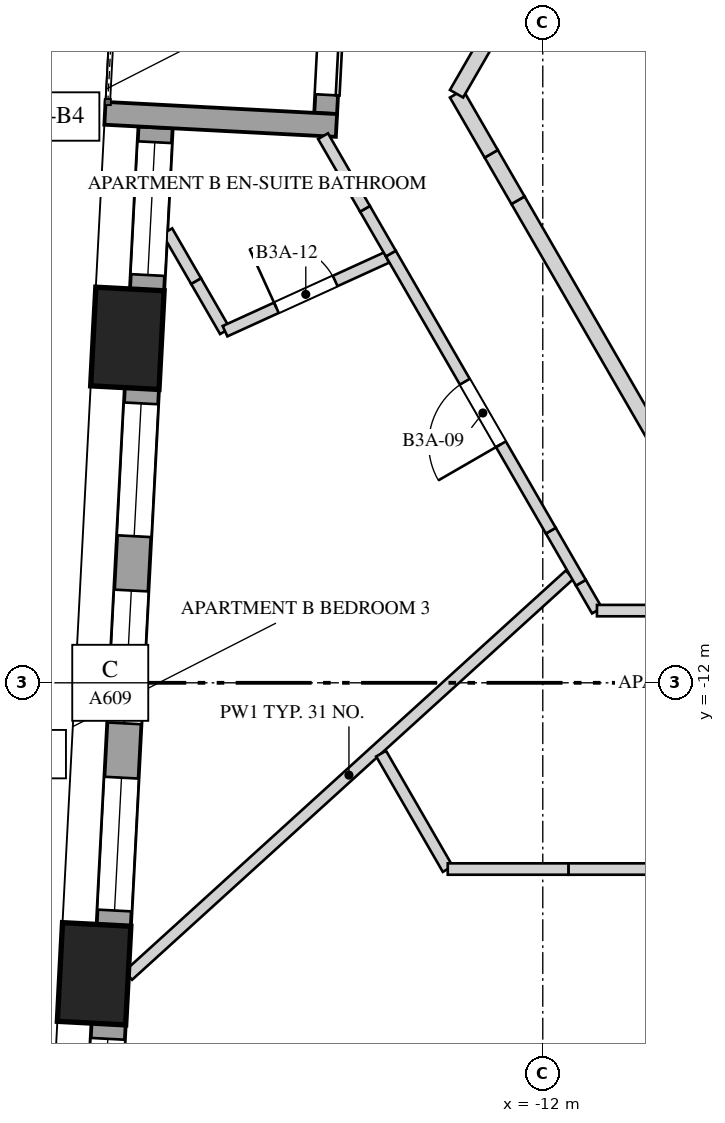
"""IFC4 building model, lengths in metres.
Left out: names, types, materials, properties, quantities, classifications, styles, units other than length and angle.
Written with IfcOpenShell. Run it as: python <this file> out.ifc"""

import sys

from ifc_helpers import new_model, si_unit, direction, frame, frame_2d, origin, origin_2d, place, context, subcontext, project, spatial, rectangle, extrude, element, fill, save


model = new_model("IFC4")
c1 = context("Model", 3, precision=1e-05, world=origin(), true_north=direction((0.0, 1.0)))
c2 = subcontext(c1, "Body", "Model", "MODEL_VIEW")
j1 = project(units=[si_unit("LENGTHUNIT", "METRE"), si_unit("PLANEANGLEUNIT", "RADIAN")], contexts=[c1])
p1 = place(None, origin())
s1 = spatial("IfcSite", under=j1, at=p1, CompositionType="ELEMENT")
p2 = place(p1, origin())
s2 = spatial("IfcBuilding", under=s1, at=p2, CompositionType="ELEMENT")
p3 = place(p2, frame((0.0, 0.0, 133.6)))
s3 = spatial("IfcBuildingStorey", under=s2, at=p3, CompositionType="ELEMENT", Elevation=133.6)
for number, where, z_axis, x_axis in (
    (1, (-17.465, -7.468, 0.0), (0.0, 0.0, 1.0), (-0.052, -0.999, 0.0)),
    (2, (-17.903, -15.828, 0.0), (0.0, 0.0, 1.0), (-0.052, -0.999, 0.0)),
):
    element("IfcColumn", number, at=place(p3, frame(where, z_axis=z_axis, x_axis=x_axis)), inside=s3, PredefinedType="COLUMN", context=c2, shape_type="SweptSolid", body=[
        extrude(rectangle(XDim=1.3, YDim=0.9, at=origin_2d()), origin(), (0.0, 0.0, 1.0), 4.0),
    ])
p4 = place(p3, frame((-17.094, -4.693, 0.0), z_axis=(0.0, 0.0, 1.0), x_axis=(-0.052355281723, -0.998628521762, 0.0)))
e3 = element("IfcWall", 3, at=p4, inside=s3, PredefinedType="SOLIDWALL", context=c2, shape_type="SweptSolid", body=[
    extrude(rectangle(XDim=2.14, YDim=0.45, at=frame_2d((1.07, 0.0))), origin(), (0.0, 0.0, 1.0), 3.3),
])
p5 = place(p4, frame((0.195, 0.0, 0.5)))
e4 = element("IfcOpeningElement", 4, at=p5, cuts=e3, PredefinedType="OPENING", context=c2, shape_type="SweptSolid", body=[
    extrude(rectangle(XDim=1.75, YDim=2.65, at=frame_2d((0.875, 1.325))), frame((0.0, 0.235, 0.0), z_axis=(0.0, -1.0, 0.0), x_axis=(1.0, 0.0, 0.0)), (0.0, 0.0, 1.0), 0.47),
])
p6 = place(p3, frame((-17.274, -8.129, 0.0), z_axis=(0.0, 0.0, 1.0), x_axis=(-0.052339570873, -0.998629345313, 0.0)))
e5 = element("IfcWall", 5, at=p6, inside=s3, PredefinedType="SOLIDWALL", context=c2, shape_type="SweptSolid", body=[
    extrude(rectangle(XDim=7.072, YDim=0.45, at=frame_2d((3.536, 0.0))), origin(), (0.0, 0.0, 1.0), 3.3),
])
p7 = place(p6, frame((0.195, 0.0, 0.5)))
e6 = element("IfcOpeningElement", 6, at=p7, cuts=e5, PredefinedType="OPENING", context=c2, shape_type="SweptSolid", body=[
    extrude(rectangle(XDim=1.75, YDim=2.65, at=frame_2d((0.875, 1.325))), frame((0.0, 0.235, 0.0), z_axis=(0.0, -1.0, 0.0), x_axis=(1.0, 0.0, 0.0)), (0.0, 0.0, 1.0), 0.47),
])
p8 = place(p6, frame((2.661, 0.0, 0.5)))
e7 = element("IfcOpeningElement", 7, at=p8, cuts=e5, PredefinedType="OPENING", context=c2, shape_type="SweptSolid", body=[
    extrude(rectangle(XDim=1.75, YDim=2.65, at=frame_2d((0.875, 1.325))), frame((0.0, 0.235, 0.0), z_axis=(0.0, -1.0, 0.0), x_axis=(1.0, 0.0, 0.0)), (0.0, 0.0, 1.0), 0.47),
])
p9 = place(p6, frame((5.126, 0.0, 0.5)))
e8 = element("IfcOpeningElement", 8, at=p9, cuts=e5, PredefinedType="OPENING", context=c2, shape_type="SweptSolid", body=[
    extrude(rectangle(XDim=1.75, YDim=2.0, at=frame_2d((0.875, 1.0))), frame((0.0, 0.235, 0.0), z_axis=(0.0, -1.0, 0.0), x_axis=(1.0, 0.0, 0.0)), (0.0, 0.0, 1.0), 0.47),
])
p10 = place(p3, frame((-17.712, -16.489, 0.0), z_axis=(0.0, 0.0, 1.0), x_axis=(-0.05234931875, -0.998628834366, 0.0)))
e9 = element("IfcWall", 9, at=p10, inside=s3, PredefinedType="SOLIDWALL", context=c2, shape_type="SweptSolid", body=[
    extrude(rectangle(XDim=2.141, YDim=0.45, at=frame_2d((1.07, 0.0))), origin(), (0.0, 0.0, 1.0), 3.3),
])
p11 = place(p10, frame((0.195, 0.0, 0.5)))
e10 = element("IfcOpeningElement", 10, at=p11, cuts=e9, PredefinedType="OPENING", context=c2, shape_type="SweptSolid", body=[
    extrude(rectangle(XDim=1.75, YDim=2.65, at=frame_2d((0.875, 1.325))), frame((0.0, 0.235, 0.0), z_axis=(0.0, -1.0, 0.0), x_axis=(1.0, 0.0, 0.0)), (0.0, 0.0, 1.0), 0.47),
])
p12 = place(p3, frame((-14.742, -2.322, 0.0), z_axis=(0.0, 0.0, 1.0), x_axis=(-0.052383338583, -0.998627050424, 0.0)))
e11 = element("IfcWall", 11, at=p12, inside=s3, PredefinedType="SOLIDWALL", context=c2, shape_type="SweptSolid", body=[
    extrude(rectangle(XDim=2.19, YDim=0.3, at=frame_2d((1.095, 0.0))), origin(), (0.0, 0.0, 1.0), 3.3),
])
p13 = place(p12, frame((0.245, 0.0, 0.0)))
e12 = element("IfcOpeningElement", 12, at=p13, cuts=e11, PredefinedType="OPENING", context=c2, shape_type="SweptSolid", body=[
    extrude(rectangle(XDim=1.7, YDim=2.45, at=frame_2d((0.85, 1.225))), frame((0.0, 0.16, 0.0), z_axis=(0.0, -1.0, 0.0), x_axis=(1.0, 0.0, 0.0)), (0.0, 0.0, 1.0), 0.32),
])
p14 = place(p3, frame((-17.76, -4.508, 0.0), z_axis=(0.0, 0.0, 1.0), x_axis=(0.998633044326, -0.052268946613, 0.0)))
e13 = element("IfcWall", 13, at=p14, inside=s3, PredefinedType="SOLIDWALL", context=c2, shape_type="SweptSolid", body=[
    extrude(rectangle(XDim=3.05, YDim=0.3, at=frame_2d((1.525, 0.0))), origin(), (0.0, 0.0, 1.0), 3.3),
])
p15 = place(p3, frame((-17.454, -15.851, 0.0), z_axis=(0.0, 0.0, 1.0), x_axis=(0.740276567096, 0.672302464824, 0.0)))
e14 = element("IfcWall", 14, at=p15, inside=s3, PredefinedType="PARTITIONING", context=c2, shape_type="SweptSolid", body=[
    extrude(rectangle(XDim=7.844, YDim=0.15, at=frame_2d((3.922, 0.0))), origin(), (0.0, 0.0, 1.0), 2.75),
])
p16 = place(p3, frame((-16.181, -7.374, 0.0), z_axis=(0.0, 0.0, 1.0), x_axis=(-0.499999897272, 0.866025463095, 0.0)))
e15 = element("IfcWall", 15, at=p16, inside=s3, PredefinedType="PARTITIONING", context=c2, shape_type="SweptSolid", body=[
    extrude(rectangle(XDim=0.762, YDim=0.15, at=frame_2d((0.381, 0.0))), origin(), (0.0, 0.0, 1.0), 2.95),
])
p17 = place(p3, frame((-16.562, -6.715, 0.0), z_axis=(0.0, 0.0, 1.0), x_axis=(-0.499917764341, 0.866072877359, 0.0)))
e16 = element("IfcWall", 16, at=p17, inside=s3, PredefinedType="PARTITIONING", context=c2, shape_type="SweptSolid", body=[
    extrude(rectangle(XDim=0.758, YDim=0.15, at=frame_2d((0.379, 0.0))), origin(), (0.0, 0.0, 1.0), 3.65),
])
p18 = place(p3, frame((-16.181, -7.374, 0.0), z_axis=(0.0, 0.0, 1.0), x_axis=(0.909943631366, 0.414731946848, 0.0)))
e17 = element("IfcWall", 17, at=p18, inside=s3, PredefinedType="PARTITIONING", context=c2, shape_type="SweptSolid", body=[
    extrude(rectangle(XDim=2.336, YDim=0.15, at=frame_2d((1.168, 0.0))), origin(), (0.0, 0.0, 1.0), 3.65),
])
p19 = place(p18, frame((0.743, 0.0, 0.0)))
e18 = element("IfcOpeningElement", 18, at=p19, cuts=e17, PredefinedType="OPENING", context=c2, shape_type="SweptSolid", body=[
    extrude(rectangle(XDim=0.85, YDim=2.4, at=frame_2d((0.425, 1.2))), frame((0.0, 0.085, 0.0), z_axis=(0.0, -1.0, 0.0), x_axis=(1.0, 0.0, 0.0)), (0.0, 0.0, 1.0), 0.17),
])
p20 = place(p3, frame((-13.25, -14.45, 0.0), z_axis=(0.0, 0.0, 1.0), x_axis=(-0.500047902311, 0.865997745606, 0.0)))
e19 = element("IfcWall", 19, at=p20, inside=s3, PredefinedType="PARTITIONING", context=c2, shape_type="SweptSolid", body=[
    extrude(rectangle(XDim=1.753, YDim=0.15, at=frame_2d((0.876, 0.0))), origin(), (0.0, 0.0, 1.0), 3.65),
])
p21 = place(p3, frame((-11.287, -11.05, 0.0), z_axis=(0.0, 0.0, 1.0), x_axis=(-0.499489419809, 0.866319986782, 0.0)))
e20 = element("IfcWall", 20, at=p21, inside=s3, PredefinedType="PARTITIONING", context=c2, shape_type="SweptSolid", body=[
    extrude(rectangle(XDim=0.423, YDim=0.15, at=frame_2d((0.212, 0.0))), origin(), (0.0, 0.0, 1.0), 3.65),
])
p22 = place(p3, frame((-11.499, -10.683, 0.0), z_axis=(0.0, 0.0, 1.0), x_axis=(-0.50012328804, 0.865954211699, 0.0)))
e21 = element("IfcWall", 21, at=p22, inside=s3, PredefinedType="PARTITIONING", context=c2, shape_type="SweptSolid", body=[
    extrude(rectangle(XDim=0.791, YDim=0.15, at=frame_2d((0.396, 0.0))), origin(), (0.0, 0.0, 1.0), 2.75),
])
p23 = place(p3, frame((-11.894, -9.999, 0.0), z_axis=(0.0, 0.0, 1.0), x_axis=(-0.500000251441, 0.866025258615, 0.0)))
e22 = element("IfcWall", 22, at=p23, inside=s3, PredefinedType="PARTITIONING", context=c2, shape_type="SweptSolid", body=[
    extrude(rectangle(XDim=4.209, YDim=0.15, at=frame_2d((2.105, 0.0))), origin(), (0.0, 0.0, 1.0), 3.65),
])
p24 = place(p23, frame((1.313, 0.0, 0.0)))
e23 = element("IfcOpeningElement", 23, at=p24, cuts=e22, PredefinedType="OPENING", context=c2, shape_type="SweptSolid", body=[
    extrude(rectangle(XDim=0.95, YDim=2.4, at=frame_2d((0.475, 1.2))), frame((0.0, 0.085, 0.0), z_axis=(0.0, -1.0, 0.0), x_axis=(1.0, 0.0, 0.0)), (0.0, 0.0, 1.0), 0.17),
])
p25 = place(p3, frame((-13.999, -6.353, 0.0), z_axis=(0.0, 0.0, 1.0), x_axis=(-0.499846793097, 0.866113839764, 0.0)))
e24 = element("IfcWall", 24, at=p25, inside=s3, PredefinedType="PARTITIONING", context=c2, shape_type="SweptSolid", body=[
    extrude(rectangle(XDim=0.68, YDim=0.15, at=frame_2d((0.34, 0.0))), origin(), (0.0, 0.0, 1.0), 2.95),
])
p26 = place(p3, frame((-14.339, -5.764, 0.0), z_axis=(0.0, 0.0, 1.0), x_axis=(-0.500111757231, 0.865960871102, 0.0)))
e25 = element("IfcWall", 25, at=p26, inside=s3, PredefinedType="PARTITIONING", context=c2, shape_type="SweptSolid", body=[
    extrude(rectangle(XDim=1.104, YDim=0.15, at=frame_2d((0.552, 0.0))), origin(), (0.0, 0.0, 1.0), 3.65),
])
p27 = place(p3, frame((-10.559, -14.45, 0.0), z_axis=(0.0, 0.0, 1.0), x_axis=(-1.0, 0.0, 0.0)))
e26 = element("IfcWall", 26, at=p27, inside=s3, PredefinedType="PARTITIONING", context=c2, shape_type="SweptSolid", body=[
    extrude(rectangle(XDim=1.104, YDim=0.15, at=frame_2d((0.552, 0.0))), origin(), (0.0, 0.0, 1.0), 2.55),
])
p28 = place(p3, frame((-11.663, -14.45, 0.0), z_axis=(0.0, 0.0, 1.0), x_axis=(-1.0, 0.0, 0.0)))
e27 = element("IfcWall", 27, at=p28, inside=s3, PredefinedType="PARTITIONING", context=c2, shape_type="SweptSolid", body=[
    extrude(rectangle(XDim=1.587, YDim=0.15, at=frame_2d((0.794, 0.0))), origin(), (0.0, 0.0, 1.0), 3.65),
])
p29 = place(p3, frame((-9.048, -11.05, 0.0), z_axis=(0.0, 0.0, 1.0), x_axis=(-1.0, 0.0, 0.0)))
e28 = element("IfcWall", 28, at=p29, inside=s3, PredefinedType="PARTITIONING", context=c2, shape_type="SweptSolid", body=[
    extrude(rectangle(XDim=2.239, YDim=0.15, at=frame_2d((1.119, 0.0))), origin(), (0.0, 0.0, 1.0), 3.65),
])
p30 = place(p3, frame((-10.525, -8.771, 0.0), z_axis=(0.0, 0.0, 1.0), x_axis=(-0.500031425827, 0.866007259314, 0.0)))
e29 = element("IfcWall", 29, at=p30, inside=s3, PredefinedType="SOLIDWALL", context=c2, shape_type="SweptSolid", body=[
    extrude(rectangle(XDim=3.602, YDim=0.2, at=frame_2d((1.801, 0.0))), origin(), (0.0, 0.0, 1.0), 3.65),
])
p31 = place(p3, frame((-12.326, -5.651, 0.0), z_axis=(0.0, 0.0, 1.0), x_axis=(-0.499752435038, 0.86616828831, 0.0)))
e30 = element("IfcWall", 30, at=p31, inside=s3, PredefinedType="SOLIDWALL", context=c2, shape_type="SweptSolid", body=[
    extrude(rectangle(XDim=0.705, YDim=0.2, at=frame_2d((0.353, 0.0))), origin(), (0.0, 0.0, 1.0), 2.95),
])
p32 = place(p3, frame((-12.678, -5.041, 0.0), z_axis=(0.0, 0.0, 1.0), x_axis=(-0.500108273885, 0.865962882802, 0.0)))
e31 = element("IfcWall", 31, at=p32, inside=s3, PredefinedType="SOLIDWALL", context=c2, shape_type="SweptSolid", body=[
    extrude(rectangle(XDim=0.913, YDim=0.2, at=frame_2d((0.457, 0.0))), origin(), (0.0, 0.0, 1.0), 3.65),
])
p33 = place(p3, frame((-13.135, -4.25, 0.0), z_axis=(0.0, 0.0, 1.0), x_axis=(0.50000466804, 0.866022708674, 0.0)))
e32 = element("IfcWall", 32, at=p33, inside=s3, PredefinedType="SOLIDWALL", context=c2, shape_type="SweptSolid", body=[
    extrude(rectangle(XDim=5.142, YDim=0.2, at=frame_2d((2.571, 0.0))), origin(), (0.0, 0.0, 1.0), 3.65),
])
p34 = place(p5, origin())
e33 = element("IfcWindow", 33, at=p34, inside=s3, PartitioningType="SINGLE_PANEL", PredefinedType="WINDOW", context=c2, shape_type="SweptSolid", body=[
    extrude(rectangle(XDim=1.75, YDim=2.65, at=frame_2d((0.875, 1.325))), frame((0.0, 0.03, 0.0), z_axis=(0.0, -1.0, 0.0), x_axis=(1.0, 0.0, 0.0)), (0.0, 0.0, 1.0), 0.06),
])
fill(e4, e33)
p35 = place(p7, origin())
e34 = element("IfcWindow", 34, at=p35, inside=s3, PartitioningType="SINGLE_PANEL", PredefinedType="WINDOW", context=c2, shape_type="SweptSolid", body=[
    extrude(rectangle(XDim=1.75, YDim=2.65, at=frame_2d((0.875, 1.325))), frame((0.0, 0.03, 0.0), z_axis=(0.0, -1.0, 0.0), x_axis=(1.0, 0.0, 0.0)), (0.0, 0.0, 1.0), 0.06),
])
fill(e6, e34)
p36 = place(p8, origin())
e35 = element("IfcWindow", 35, at=p36, inside=s3, PartitioningType="SINGLE_PANEL", PredefinedType="WINDOW", context=c2, shape_type="SweptSolid", body=[
    extrude(rectangle(XDim=1.75, YDim=2.65, at=frame_2d((0.875, 1.325))), frame((0.0, 0.03, 0.0), z_axis=(0.0, -1.0, 0.0), x_axis=(1.0, 0.0, 0.0)), (0.0, 0.0, 1.0), 0.06),
])
fill(e7, e35)
p37 = place(p9, origin())
e36 = element("IfcWindow", 36, at=p37, inside=s3, PartitioningType="SINGLE_PANEL", PredefinedType="WINDOW", context=c2, shape_type="SweptSolid", body=[
    extrude(rectangle(XDim=1.75, YDim=2.0, at=frame_2d((0.875, 1.0))), frame((0.0, 0.03, 0.0), z_axis=(0.0, -1.0, 0.0), x_axis=(1.0, 0.0, 0.0)), (0.0, 0.0, 1.0), 0.06),
])
fill(e8, e36)
p38 = place(p11, origin())
e37 = element("IfcWindow", 37, at=p38, inside=s3, PartitioningType="SINGLE_PANEL", PredefinedType="WINDOW", context=c2, shape_type="SweptSolid", body=[
    extrude(rectangle(XDim=1.75, YDim=2.65, at=frame_2d((0.875, 1.325))), frame((0.0, 0.03, 0.0), z_axis=(0.0, -1.0, 0.0), x_axis=(1.0, 0.0, 0.0)), (0.0, 0.0, 1.0), 0.06),
])
fill(e10, e37)
p39 = place(p13, origin())
e38 = element("IfcDoor", 38, at=p39, inside=s3, OperationType="SLIDING_TO_LEFT", PredefinedType="DOOR", context=c2, shape_type="SweptSolid", body=[
    extrude(rectangle(XDim=1.7, YDim=2.45, at=frame_2d((0.85, 1.225))), frame((0.0, 0.025, 0.0), z_axis=(0.0, -1.0, 0.0), x_axis=(1.0, 0.0, 0.0)), (0.0, 0.0, 1.0), 0.05),
])
fill(e12, e38)
p40 = place(p24, origin())
e39 = element("IfcDoor", 39, at=p40, inside=s3, OperationType="SINGLE_SWING_LEFT", PredefinedType="DOOR", context=c2, shape_type="SweptSolid", body=[
    extrude(rectangle(XDim=0.95, YDim=2.4, at=frame_2d((0.475, 1.2))), frame((0.0, 0.025, 0.0), z_axis=(0.0, -1.0, 0.0), x_axis=(1.0, 0.0, 0.0)), (0.0, 0.0, 1.0), 0.05),
])
fill(e23, e39)
p41 = place(p19, origin())
e40 = element("IfcDoor", 40, at=p41, inside=s3, OperationType="SINGLE_SWING_RIGHT", PredefinedType="DOOR", context=c2, shape_type="SweptSolid", body=[
    extrude(rectangle(XDim=0.85, YDim=2.4, at=frame_2d((0.425, 1.2))), frame((0.0, 0.025, 0.0), z_axis=(0.0, -1.0, 0.0), x_axis=(1.0, 0.0, 0.0)), (0.0, 0.0, 1.0), 0.05),
])
fill(e18, e40)
save(model, sys.argv[1])
